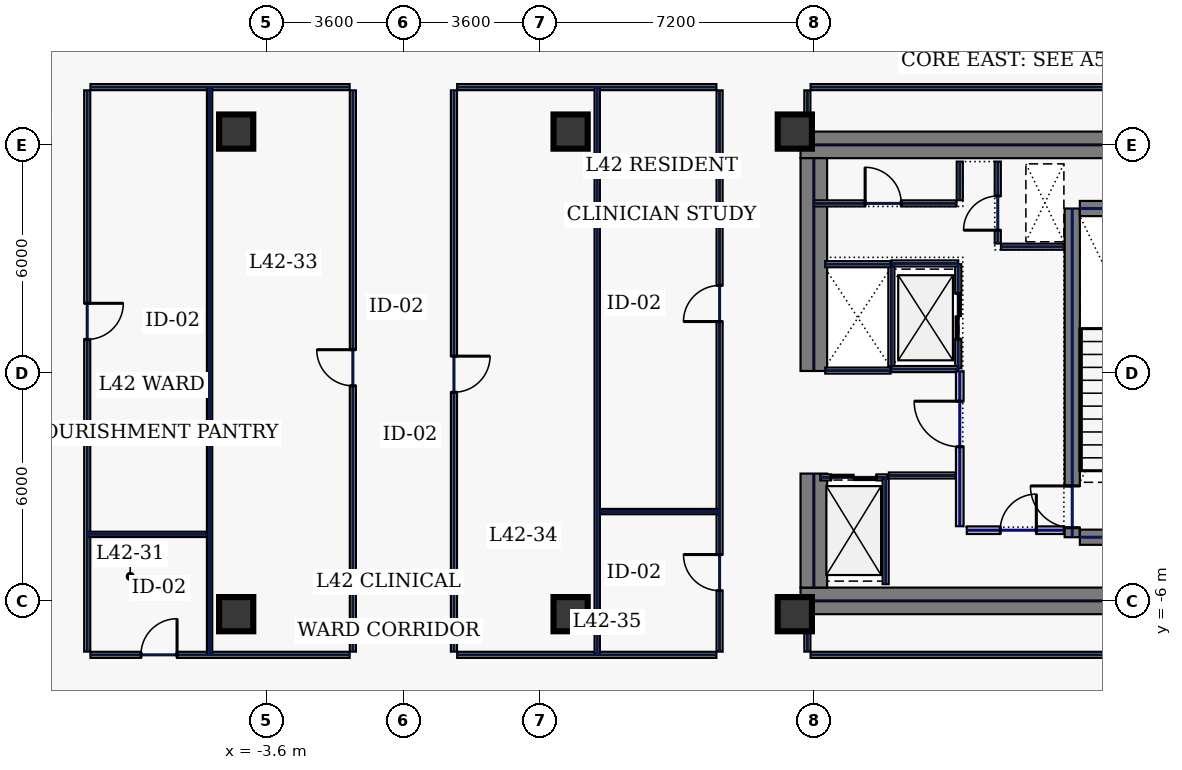
"""IFC4 building model, lengths in metres.
Left out: names, types, materials, properties, quantities, classifications, styles, units other than length and angle.
Written with IfcOpenShell. Run it as: python <this file> out.ifc"""

import sys

from ifc_helpers import new_model, si_unit, direction, frame, frame_2d, origin, origin_2d, place, context, subcontext, project, spatial, rectangle, hollow_rectangle, extrude, element, fill, save


model = new_model("IFC4")
c1 = context("Model", 3, precision=1e-05, world=origin(), true_north=direction((0.0, 1.0)))
c2 = subcontext(c1, "Body", "Model", "MODEL_VIEW")
j1 = project(units=[si_unit("LENGTHUNIT", "METRE"), si_unit("PLANEANGLEUNIT", "RADIAN")], contexts=[c1])
p1 = place(None, origin())
s1 = spatial("IfcSite", under=j1, at=p1, CompositionType="ELEMENT")
p2 = place(p1, origin())
s2 = spatial("IfcBuilding", under=s1, at=p2, CompositionType="ELEMENT")
p3 = place(p2, frame((0.0, 0.0, 184.2)))
s3 = spatial("IfcBuildingStorey", under=s2, at=p3, CompositionType="ELEMENT", Elevation=184.2)
for number, where, z_axis, x_axis in (
    (1, (10.45, 6.0, 0.0), (0.0, 0.0, 1.0), (1.0, 0.0, 0.0)),
    (2, (10.45, -6.0, 0.0), (0.0, 0.0, 1.0), (1.0, 0.0, 0.0)),
):
    element("IfcWall", number, at=place(p3, frame(where, z_axis=z_axis, x_axis=x_axis)), inside=s3, PredefinedType="SHEAR", context=c2, shape_type="SweptSolid", body=[
        extrude(rectangle(XDim=11.55, YDim=0.7, at=frame_2d((5.775, 0.0))), origin(), (0.0, 0.0, 1.0), 3.74),
    ])
p4 = place(p3, frame((10.8, -5.65, 0.0), z_axis=(0.0, 0.0, 1.0), x_axis=(0.0, 1.0, 0.0)))
e3 = element("IfcWall", 3, at=p4, inside=s3, PredefinedType="SHEAR", context=c2, shape_type="SweptSolid", body=[
    extrude(rectangle(XDim=3.0, YDim=0.7, at=frame_2d((1.5, 0.0))), origin(), (0.0, 0.0, 1.0), 3.74),
])
p5 = place(p3, frame((10.8, 0.05, 0.0), z_axis=(0.0, 0.0, 1.0), x_axis=(0.0, 1.0, 0.0)))
e4 = element("IfcWall", 4, at=p5, inside=s3, PredefinedType="SHEAR", context=c2, shape_type="SweptSolid", body=[
    extrude(rectangle(XDim=5.6, YDim=0.7, at=frame_2d((2.8, 0.0))), origin(), (0.0, 0.0, 1.0), 3.74),
])
p6 = place(p3, frame((17.6, -4.325, 0.0), z_axis=(0.0, 0.0, 1.0), x_axis=(0.0, 1.0, 0.0)))
e5 = element("IfcWall", 5, at=p6, inside=s3, PredefinedType="SHEAR", context=c2, shape_type="SweptSolid", body=[
    extrude(rectangle(XDim=8.65, YDim=0.4, at=frame_2d((4.325, 0.0))), origin(), (0.0, 0.0, 1.0), 3.74),
])
p7 = place(p6, frame((0.25, 0.0, 0.0)))
e6 = element("IfcOpeningElement", 6, at=p7, cuts=e5, PredefinedType="OPENING", context=c2, shape_type="SweptSolid", body=[
    extrude(rectangle(XDim=1.1, YDim=2.2, at=frame_2d((0.55, 1.1))), frame((0.0, 0.21, 0.0), z_axis=(0.0, -1.0, 0.0), x_axis=(1.0, 0.0, 0.0)), (0.0, 0.0, 1.0), 0.42),
])
for number, where, z_axis, x_axis in (
    (7, (17.8, -4.325, 0.0), (0.0, 0.0, 1.0), (1.0, 0.0, 0.0)),
    (8, (17.8, 4.325, 0.0), (0.0, 0.0, 1.0), (1.0, 0.0, 0.0)),
):
    element("IfcWall", number, at=place(p3, frame(where, z_axis=z_axis, x_axis=x_axis)), inside=s3, PredefinedType="SHEAR", context=c2, shape_type="SweptSolid", body=[
        extrude(rectangle(XDim=3.4, YDim=0.4, at=frame_2d((1.7, 0.0))), origin(), (0.0, 0.0, 1.0), 3.74),
    ])
for number, where, z_axis, x_axis in (
    (9, (10.3, -6.35, 0.0), (0.0, 0.0, 1.0), (1.0, 0.0, 0.0)),
    (10, (10.3, 6.35, 0.0), (0.0, 0.0, 1.0), (1.0, 0.0, 0.0)),
    (11, (-4.4, -6.35, 0.0), (0.0, 0.0, 1.0), (1.0, 0.0, 0.0)),
    (12, (4.4, -6.35, 0.0), (0.0, 0.0, 1.0), (1.0, 0.0, 0.0)),
    (13, (-4.4, 6.35, 0.0), (0.0, 0.0, 1.0), (1.0, 0.0, 0.0)),
    (14, (4.4, 6.35, 0.0), (0.0, 0.0, 1.0), (1.0, 0.0, 0.0)),
):
    element("IfcColumn", number, at=place(p3, frame(where, z_axis=z_axis, x_axis=x_axis)), inside=s3, PredefinedType="COLUMN", context=c2, shape_type="SweptSolid", body=[
        extrude(hollow_rectangle(XDim=0.9, YDim=0.9, WallThickness=0.04, at=origin_2d()), origin(), (0.0, 0.0, 1.0), 3.74),
    ])
p8 = place(p3, frame((14.6, 0.12, 0.0), z_axis=(0.0, 0.0, 1.0), x_axis=(0.0, 1.0, 0.0)))
e15 = element("IfcWall", 15, at=p8, inside=s3, PredefinedType="PARTITIONING", context=c2, shape_type="SweptSolid", body=[
    extrude(rectangle(XDim=2.74, YDim=0.16, at=frame_2d((1.37, 0.0))), origin(), (0.0, 0.0, 1.0), 3.74),
])
p9 = place(p8, frame((0.77, 0.0, 0.0)))
e16 = element("IfcOpeningElement", 16, at=p9, cuts=e15, PredefinedType="OPENING", context=c2, shape_type="SweptSolid", body=[
    extrude(rectangle(XDim=1.2, YDim=2.2, at=frame_2d((0.6, 1.1))), frame((0.0, 0.09, 0.0), z_axis=(0.0, -1.0, 0.0), x_axis=(1.0, 0.0, 0.0)), (0.0, 0.0, 1.0), 0.18),
])
for number, where, z_axis, x_axis in (
    (17, (12.84, 0.1, 0.0), (0.0, 0.0, 1.0), (1.0, 0.0, 0.0)),
    (18, (12.84, 2.88, 0.0), (0.0, 0.0, 1.0), (1.0, 0.0, 0.0)),
):
    element("IfcWall", number, at=place(p3, frame(where, z_axis=z_axis, x_axis=x_axis)), inside=s3, PredefinedType="PARTITIONING", context=c2, shape_type="SweptSolid", body=[
        extrude(rectangle(XDim=1.76, YDim=0.16, at=frame_2d((0.88, 0.0))), origin(), (0.0, 0.0, 1.0), 3.74),
    ])
p10 = place(p3, frame((12.84, 0.18, 0.0), z_axis=(0.0, 0.0, 1.0), x_axis=(0.0, 1.0, 0.0)))
e19 = element("IfcWall", 19, at=p10, inside=s3, PredefinedType="PARTITIONING", context=c2, shape_type="SweptSolid", body=[
    extrude(rectangle(XDim=2.62, YDim=0.16, at=frame_2d((1.31, 0.0))), origin(), (0.0, 0.0, 1.0), 3.74),
])
p11 = place(p3, frame((10.97, -2.75, 0.0), z_axis=(0.0, 0.0, 1.0), x_axis=(1.0, 0.0, 0.0)))
e20 = element("IfcWall", 20, at=p11, inside=s3, PredefinedType="PARTITIONING", context=c2, shape_type="SweptSolid", body=[
    extrude(rectangle(XDim=1.76, YDim=0.16, at=frame_2d((0.88, 0.0))), origin(), (0.0, 0.0, 1.0), 3.74),
])
p12 = place(p11, frame((0.28, 0.0, 0.0)))
e21 = element("IfcOpeningElement", 21, at=p12, cuts=e20, PredefinedType="OPENING", context=c2, shape_type="SweptSolid", body=[
    extrude(rectangle(XDim=1.2, YDim=2.2, at=frame_2d((0.6, 1.1))), frame((0.0, 0.09, 0.0), z_axis=(0.0, -1.0, 0.0), x_axis=(1.0, 0.0, 0.0)), (0.0, 0.0, 1.0), 0.18),
])
for number, where, z_axis, x_axis in (
    (22, (11.1, 0.06, 0.0), (0.0, 0.0, 1.0), (1.0, 0.0, 0.0)),
    (23, (11.1, 2.86, 0.0), (0.0, 0.0, 1.0), (1.0, 0.0, 0.0)),
):
    element("IfcWall", number, at=place(p3, frame(where, z_axis=z_axis, x_axis=x_axis)), inside=s3, PredefinedType="PARTITIONING", context=c2, shape_type="SweptSolid", body=[
        extrude(rectangle(XDim=1.72, YDim=0.16, at=frame_2d((0.86, 0.0))), origin(), (0.0, 0.0, 1.0), 3.74),
    ])
p13 = place(p3, frame((15.64, 3.405, 0.0), z_axis=(0.0, 0.0, 1.0), x_axis=(0.0, 1.0, 0.0)))
e24 = element("IfcWall", 24, at=p13, inside=s3, PredefinedType="PARTITIONING", context=c2, shape_type="SweptSolid", body=[
    extrude(rectangle(XDim=2.155, YDim=0.16, at=frame_2d((1.078, 0.0))), origin(), (0.0, 0.0, 1.0), 3.74),
])
p14 = place(p13, frame((0.35, 0.0, 0.0)))
e25 = element("IfcOpeningElement", 25, at=p14, cuts=e24, PredefinedType="OPENING", context=c2, shape_type="SweptSolid", body=[
    extrude(rectangle(XDim=0.9, YDim=2.2, at=frame_2d((0.45, 1.1))), frame((0.0, 0.09, 0.0), z_axis=(0.0, -1.0, 0.0), x_axis=(1.0, 0.0, 0.0)), (0.0, 0.0, 1.0), 0.18),
])
p15 = place(p3, frame((15.725, 3.32, 0.0), z_axis=(0.0, 0.0, 1.0), x_axis=(1.0, 0.0, 0.0)))
e26 = element("IfcWall", 26, at=p15, inside=s3, PredefinedType="PARTITIONING", context=c2, shape_type="SweptSolid", body=[
    extrude(rectangle(XDim=1.655, YDim=0.16, at=frame_2d((0.827, 0.0))), origin(), (0.0, 0.0, 1.0), 3.74),
])
p16 = place(p3, frame((14.825, -4.14, 0.0), z_axis=(0.0, 0.0, 1.0), x_axis=(1.0, 0.0, 0.0)))
e27 = element("IfcWall", 27, at=p16, inside=s3, PredefinedType="SOLIDWALL", context=c2, shape_type="SweptSolid", body=[
    extrude(rectangle(XDim=2.555, YDim=0.2, at=frame_2d((1.277, 0.0))), origin(), (0.0, 0.0, 1.0), 3.74),
])
p17 = place(p16, frame((0.88, 0.0, 0.0)))
e28 = element("IfcOpeningElement", 28, at=p17, cuts=e27, PredefinedType="OPENING", context=c2, shape_type="SweptSolid", body=[
    extrude(rectangle(XDim=0.95, YDim=2.2, at=frame_2d((0.475, 1.1))), frame((0.0, 0.11, 0.0), z_axis=(0.0, -1.0, 0.0), x_axis=(1.0, 0.0, 0.0)), (0.0, 0.0, 1.0), 0.22),
])
p18 = place(p3, frame((12.775, -2.7, 0.0), z_axis=(0.0, 0.0, 1.0), x_axis=(1.0, 0.0, 0.0)))
e29 = element("IfcWall", 29, at=p18, inside=s3, PredefinedType="PARTITIONING", context=c2, shape_type="SweptSolid", body=[
    extrude(rectangle(XDim=1.76, YDim=0.16, at=frame_2d((0.88, 0.0))), origin(), (0.0, 0.0, 1.0), 3.74),
])
p19 = place(p3, frame((12.69, -5.56, 0.0), z_axis=(0.0, 0.0, 1.0), x_axis=(0.0, 1.0, 0.0)))
e30 = element("IfcWall", 30, at=p19, inside=s3, PredefinedType="PARTITIONING", context=c2, shape_type="SweptSolid", body=[
    extrude(rectangle(XDim=2.775, YDim=0.16, at=frame_2d((1.388, 0.0))), origin(), (0.0, 0.0, 1.0), 3.74),
])
p20 = place(p3, frame((10.8, 4.46, 0.0), z_axis=(0.0, 0.0, 1.0), x_axis=(1.0, 0.0, 0.0)))
e31 = element("IfcWall", 31, at=p20, inside=s3, PredefinedType="PARTITIONING", context=c2, shape_type="SweptSolid", body=[
    extrude(rectangle(XDim=3.755, YDim=0.16, at=frame_2d((1.877, 0.0))), origin(), (0.0, 0.0, 1.0), 3.74),
])
p21 = place(p20, frame((1.35, 0.0, 0.0)))
e32 = element("IfcOpeningElement", 32, at=p21, cuts=e31, PredefinedType="OPENING", context=c2, shape_type="SweptSolid", body=[
    extrude(rectangle(XDim=0.95, YDim=2.2, at=frame_2d((0.475, 1.1))), frame((0.0, 0.09, 0.0), z_axis=(0.0, -1.0, 0.0), x_axis=(1.0, 0.0, 0.0)), (0.0, 0.0, 1.0), 0.18),
])
p22 = place(p3, frame((14.64, 4.545, 0.0), z_axis=(0.0, 0.0, 1.0), x_axis=(0.0, 1.0, 0.0)))
e33 = element("IfcWall", 33, at=p22, inside=s3, PredefinedType="PARTITIONING", context=c2, shape_type="SweptSolid", body=[
    extrude(rectangle(XDim=1.015, YDim=0.16, at=frame_2d((0.508, 0.0))), origin(), (0.0, 0.0, 1.0), 3.74),
])
p23 = place(p3, frame((14.64, -4.035, 0.0), z_axis=(0.0, 0.0, 1.0), x_axis=(0.0, 1.0, 0.0)))
e34 = element("IfcWall", 34, at=p23, inside=s3, PredefinedType="SOLIDWALL", context=c2, shape_type="SweptSolid", body=[
    extrude(rectangle(XDim=4.075, YDim=0.2, at=frame_2d((2.038, 0.0))), origin(), (0.0, 0.0, 1.0), 3.74),
])
p24 = place(p23, frame((2.09, 0.0, 0.0)))
e35 = element("IfcOpeningElement", 35, at=p24, cuts=e34, PredefinedType="OPENING", context=c2, shape_type="SweptSolid", body=[
    extrude(rectangle(XDim=1.2, YDim=2.2, at=frame_2d((0.6, 1.1))), frame((0.0, 0.11, 0.0), z_axis=(0.0, -1.0, 0.0), x_axis=(1.0, 0.0, 0.0)), (0.0, 0.0, 1.0), 0.22),
])
p25 = place(p3, frame((24.965, 7.52, 0.0), z_axis=(0.0, 0.0, 1.0), x_axis=(-1.0, 0.0, 0.0)))
e36 = element("IfcWall", 36, at=p25, inside=s3, PredefinedType="PARTITIONING", context=c2, shape_type="SweptSolid", body=[
    extrude(rectangle(XDim=14.25, YDim=0.16, at=frame_2d((7.125, 0.0))), origin(), (0.0, 0.0, 1.0), 3.74),
])
p26 = place(p3, frame((10.63, 7.435, 0.0), z_axis=(0.0, 0.0, 1.0), x_axis=(0.0, -1.0, 0.0)))
e37 = element("IfcWall", 37, at=p26, inside=s3, PredefinedType="PARTITIONING", context=c2, shape_type="SweptSolid", body=[
    extrude(rectangle(XDim=1.015, YDim=0.16, at=frame_2d((0.508, 0.0))), origin(), (0.0, 0.0, 1.0), 3.285),
])
p27 = place(p3, frame((10.63, -6.42, 0.0), z_axis=(0.0, 0.0, 1.0), x_axis=(0.0, -1.0, 0.0)))
e38 = element("IfcWall", 38, at=p27, inside=s3, PredefinedType="PARTITIONING", context=c2, shape_type="SweptSolid", body=[
    extrude(rectangle(XDim=0.915, YDim=0.16, at=frame_2d((0.458, 0.0))), origin(), (0.0, 0.0, 1.0), 3.74),
])
p28 = place(p3, frame((10.715, -7.42, 0.0), z_axis=(0.0, 0.0, 1.0), x_axis=(1.0, 0.0, 0.0)))
e39 = element("IfcWall", 39, at=p28, inside=s3, PredefinedType="PARTITIONING", context=c2, shape_type="SweptSolid", body=[
    extrude(rectangle(XDim=14.25, YDim=0.16, at=frame_2d((7.125, 0.0))), origin(), (0.0, 0.0, 1.0), 3.74),
])
p29 = place(p3, frame((8.235, 7.52, 0.0), z_axis=(0.0, 0.0, 1.0), x_axis=(-1.0, 0.0, 0.0)))
e40 = element("IfcWall", 40, at=p29, inside=s3, PredefinedType="PARTITIONING", context=c2, shape_type="SweptSolid", body=[
    extrude(rectangle(XDim=6.82, YDim=0.16, at=frame_2d((3.41, 0.0))), origin(), (0.0, 0.0, 1.0), 3.74),
])
p30 = place(p3, frame((1.33, 7.435, 0.0), z_axis=(0.0, 0.0, 1.0), x_axis=(0.0, -1.0, 0.0)))
e41 = element("IfcWall", 41, at=p30, inside=s3, PredefinedType="PARTITIONING", context=c2, shape_type="SweptSolid", body=[
    extrude(rectangle(XDim=14.77, YDim=0.16, at=frame_2d((7.385, 0.0))), origin(), (0.0, 0.0, 1.0), 3.74),
])
p31 = place(p30, frame((6.995, 0.0, 0.0)))
e42 = element("IfcOpeningElement", 42, at=p31, cuts=e41, PredefinedType="OPENING", context=c2, shape_type="SweptSolid", body=[
    extrude(rectangle(XDim=0.95, YDim=2.2, at=frame_2d((0.475, 1.1))), frame((0.0, 0.09, 0.0), z_axis=(0.0, -1.0, 0.0), x_axis=(1.0, 0.0, 0.0)), (0.0, 0.0, 1.0), 0.18),
])
p32 = place(p3, frame((1.415, -7.42, 0.0), z_axis=(0.0, 0.0, 1.0), x_axis=(1.0, 0.0, 0.0)))
e43 = element("IfcWall", 43, at=p32, inside=s3, PredefinedType="PARTITIONING", context=c2, shape_type="SweptSolid", body=[
    extrude(rectangle(XDim=6.82, YDim=0.16, at=frame_2d((3.41, 0.0))), origin(), (0.0, 0.0, 1.0), 3.74),
])
p33 = place(p3, frame((8.32, -7.335, 0.0), z_axis=(0.0, 0.0, 1.0), x_axis=(0.0, 1.0, 0.0)))
e44 = element("IfcWall", 44, at=p33, inside=s3, PredefinedType="PARTITIONING", context=c2, shape_type="SweptSolid", body=[
    extrude(rectangle(XDim=14.77, YDim=0.16, at=frame_2d((7.385, 0.0))), origin(), (0.0, 0.0, 1.0), 3.74),
])
p34 = place(p33, frame((1.604, 0.0, 0.0)))
e45 = element("IfcOpeningElement", 45, at=p34, cuts=e44, PredefinedType="OPENING", context=c2, shape_type="SweptSolid", body=[
    extrude(rectangle(XDim=0.95, YDim=2.2, at=frame_2d((0.475, 1.1))), frame((0.0, 0.09, 0.0), z_axis=(0.0, -1.0, 0.0), x_axis=(1.0, 0.0, 0.0)), (0.0, 0.0, 1.0), 0.18),
])
p35 = place(p33, frame((8.686, 0.0, 0.0)))
e46 = element("IfcOpeningElement", 46, at=p35, cuts=e44, PredefinedType="OPENING", context=c2, shape_type="SweptSolid", body=[
    extrude(rectangle(XDim=0.95, YDim=2.2, at=frame_2d((0.475, 1.1))), frame((0.0, 0.09, 0.0), z_axis=(0.0, -1.0, 0.0), x_axis=(1.0, 0.0, 0.0)), (0.0, 0.0, 1.0), 0.18),
])
p36 = place(p3, frame((-1.33, -7.335, 0.0), z_axis=(0.0, 0.0, 1.0), x_axis=(0.0, 1.0, 0.0)))
e47 = element("IfcWall", 47, at=p36, inside=s3, PredefinedType="PARTITIONING", context=c2, shape_type="SweptSolid", body=[
    extrude(rectangle(XDim=14.77, YDim=0.16, at=frame_2d((7.385, 0.0))), origin(), (0.0, 0.0, 1.0), 3.74),
])
p37 = place(p36, frame((6.995, 0.0, 0.0)))
e48 = element("IfcOpeningElement", 48, at=p37, cuts=e47, PredefinedType="OPENING", context=c2, shape_type="SweptSolid", body=[
    extrude(rectangle(XDim=0.95, YDim=2.2, at=frame_2d((0.475, 1.1))), frame((0.0, 0.09, 0.0), z_axis=(0.0, -1.0, 0.0), x_axis=(1.0, 0.0, 0.0)), (0.0, 0.0, 1.0), 0.18),
])
p38 = place(p3, frame((-1.415, 7.52, 0.0), z_axis=(0.0, 0.0, 1.0), x_axis=(-1.0, 0.0, 0.0)))
e49 = element("IfcWall", 49, at=p38, inside=s3, PredefinedType="PARTITIONING", context=c2, shape_type="SweptSolid", body=[
    extrude(rectangle(XDim=6.82, YDim=0.16, at=frame_2d((3.41, 0.0))), origin(), (0.0, 0.0, 1.0), 3.74),
])
p39 = place(p3, frame((-8.32, 7.435, 0.0), z_axis=(0.0, 0.0, 1.0), x_axis=(0.0, -1.0, 0.0)))
e50 = element("IfcWall", 50, at=p39, inside=s3, PredefinedType="PARTITIONING", context=c2, shape_type="SweptSolid", body=[
    extrude(rectangle(XDim=14.77, YDim=0.16, at=frame_2d((7.385, 0.0))), origin(), (0.0, 0.0, 1.0), 3.74),
])
p40 = place(p39, frame((5.604, 0.0, 0.0)))
e51 = element("IfcOpeningElement", 51, at=p40, cuts=e50, PredefinedType="OPENING", context=c2, shape_type="SweptSolid", body=[
    extrude(rectangle(XDim=0.95, YDim=2.2, at=frame_2d((0.475, 1.1))), frame((0.0, 0.09, 0.0), z_axis=(0.0, -1.0, 0.0), x_axis=(1.0, 0.0, 0.0)), (0.0, 0.0, 1.0), 0.18),
])
p41 = place(p3, frame((-8.235, -7.42, 0.0), z_axis=(0.0, 0.0, 1.0), x_axis=(1.0, 0.0, 0.0)))
e52 = element("IfcWall", 52, at=p41, inside=s3, PredefinedType="PARTITIONING", context=c2, shape_type="SweptSolid", body=[
    extrude(rectangle(XDim=6.82, YDim=0.16, at=frame_2d((3.41, 0.0))), origin(), (0.0, 0.0, 1.0), 3.74),
])
p42 = place(p41, frame((1.329, 0.0, 0.0)))
e53 = element("IfcOpeningElement", 53, at=p42, cuts=e52, PredefinedType="OPENING", context=c2, shape_type="SweptSolid", body=[
    extrude(rectangle(XDim=0.95, YDim=2.2, at=frame_2d((0.475, 1.1))), frame((0.0, 0.09, 0.0), z_axis=(0.0, -1.0, 0.0), x_axis=(1.0, 0.0, 0.0)), (0.0, 0.0, 1.0), 0.18),
])
for number, where, z_axis, x_axis in (
    (54, (-5.1, -7.415, 0.0), (0.0, 0.0, 1.0), (0.0, 1.0, 0.0)),
    (55, (5.1, -7.415, 0.0), (0.0, 0.0, 1.0), (0.0, 1.0, 0.0)),
):
    element("IfcWall", number, at=place(p3, frame(where, z_axis=z_axis, x_axis=x_axis)), inside=s3, PredefinedType="PARTITIONING", context=c2, shape_type="SweptSolid", body=[
        extrude(rectangle(XDim=14.93, YDim=0.14, at=frame_2d((7.465, 0.0))), origin(), (0.0, 0.0, 1.0), 3.74),
    ])
for number, where, z_axis, x_axis in (
    (56, (-8.315, -4.25, 0.0), (0.0, 0.0, 1.0), (1.0, 0.0, 0.0)),
    (57, (5.175, -3.65, 0.0), (0.0, 0.0, 1.0), (1.0, 0.0, 0.0)),
):
    element("IfcWall", number, at=place(p3, frame(where, z_axis=z_axis, x_axis=x_axis)), inside=s3, PredefinedType="PARTITIONING", context=c2, shape_type="SweptSolid", body=[
        extrude(rectangle(XDim=3.14, YDim=0.14, at=frame_2d((1.57, 0.0))), origin(), (0.0, 0.0, 1.0), 3.74),
    ])
p43 = place(p7, origin())
e58 = element("IfcDoor", 58, at=p43, inside=s3, OperationType="SINGLE_SWING_RIGHT", PredefinedType="DOOR", context=c2, shape_type="SweptSolid", body=[
    extrude(rectangle(XDim=1.1, YDim=2.2, at=frame_2d((0.55, 1.1))), frame((0.0, 0.025, 0.0), z_axis=(0.0, -1.0, 0.0), x_axis=(1.0, 0.0, 0.0)), (0.0, 0.0, 1.0), 0.05),
])
fill(e6, e58)
p44 = place(p9, origin())
e59 = element("IfcDoor", 59, at=p44, inside=s3, OperationType="SLIDING_TO_LEFT", PredefinedType="DOOR", context=c2, shape_type="SweptSolid", body=[
    extrude(rectangle(XDim=1.2, YDim=2.2, at=frame_2d((0.6, 1.1))), frame((0.0, 0.025, 0.0), z_axis=(0.0, -1.0, 0.0), x_axis=(1.0, 0.0, 0.0)), (0.0, 0.0, 1.0), 0.05),
])
fill(e16, e59)
p45 = place(p12, origin())
e60 = element("IfcDoor", 60, at=p45, inside=s3, OperationType="SLIDING_TO_LEFT", PredefinedType="DOOR", context=c2, shape_type="SweptSolid", body=[
    extrude(rectangle(XDim=1.2, YDim=2.2, at=frame_2d((0.6, 1.1))), frame((0.0, 0.025, 0.0), z_axis=(0.0, -1.0, 0.0), x_axis=(1.0, 0.0, 0.0)), (0.0, 0.0, 1.0), 0.05),
])
fill(e21, e60)
p46 = place(p14, origin())
e61 = element("IfcDoor", 61, at=p46, inside=s3, OperationType="SINGLE_SWING_LEFT", PredefinedType="DOOR", context=c2, shape_type="SweptSolid", body=[
    extrude(rectangle(XDim=0.9, YDim=2.2, at=frame_2d((0.45, 1.1))), frame((0.0, 0.025, 0.0), z_axis=(0.0, -1.0, 0.0), x_axis=(1.0, 0.0, 0.0)), (0.0, 0.0, 1.0), 0.05),
])
fill(e25, e61)
p47 = place(p17, origin())
e62 = element("IfcDoor", 62, at=p47, inside=s3, OperationType="SINGLE_SWING_RIGHT", PredefinedType="DOOR", context=c2, shape_type="SweptSolid", body=[
    extrude(rectangle(XDim=0.95, YDim=2.2, at=frame_2d((0.475, 1.1))), frame((0.0, 0.025, 0.0), z_axis=(0.0, -1.0, 0.0), x_axis=(1.0, 0.0, 0.0)), (0.0, 0.0, 1.0), 0.05),
])
fill(e28, e62)
p48 = place(p21, origin())
e63 = element("IfcDoor", 63, at=p48, inside=s3, OperationType="SINGLE_SWING_LEFT", PredefinedType="DOOR", context=c2, shape_type="SweptSolid", body=[
    extrude(rectangle(XDim=0.95, YDim=2.2, at=frame_2d((0.475, 1.1))), frame((0.0, 0.025, 0.0), z_axis=(0.0, -1.0, 0.0), x_axis=(1.0, 0.0, 0.0)), (0.0, 0.0, 1.0), 0.05),
])
fill(e32, e63)
p49 = place(p24, origin())
e64 = element("IfcDoor", 64, at=p49, inside=s3, OperationType="SINGLE_SWING_RIGHT", PredefinedType="DOOR", context=c2, shape_type="SweptSolid", body=[
    extrude(rectangle(XDim=1.2, YDim=2.2, at=frame_2d((0.6, 1.1))), frame((0.0, 0.025, 0.0), z_axis=(0.0, -1.0, 0.0), x_axis=(1.0, 0.0, 0.0)), (0.0, 0.0, 1.0), 0.05),
])
fill(e35, e64)
p50 = place(p42, origin())
e65 = element("IfcDoor", 65, at=p50, inside=s3, OperationType="SINGLE_SWING_RIGHT", PredefinedType="DOOR", context=c2, shape_type="SweptSolid", body=[
    extrude(rectangle(XDim=0.95, YDim=2.2, at=frame_2d((0.475, 1.1))), frame((0.0, 0.025, 0.0), z_axis=(0.0, -1.0, 0.0), x_axis=(1.0, 0.0, 0.0)), (0.0, 0.0, 1.0), 0.05),
])
fill(e53, e65)
p51 = place(p40, origin())
e66 = element("IfcDoor", 66, at=p51, inside=s3, OperationType="SINGLE_SWING_LEFT", PredefinedType="DOOR", context=c2, shape_type="SweptSolid", body=[
    extrude(rectangle(XDim=0.95, YDim=2.2, at=frame_2d((0.475, 1.1))), frame((0.0, 0.025, 0.0), z_axis=(0.0, -1.0, 0.0), x_axis=(1.0, 0.0, 0.0)), (0.0, 0.0, 1.0), 0.05),
])
fill(e51, e66)
p52 = place(p37, origin())
e67 = element("IfcDoor", 67, at=p52, inside=s3, OperationType="SINGLE_SWING_RIGHT", PredefinedType="DOOR", context=c2, shape_type="SweptSolid", body=[
    extrude(rectangle(XDim=0.95, YDim=2.2, at=frame_2d((0.475, 1.1))), frame((0.0, 0.025, 0.0), z_axis=(0.0, -1.0, 0.0), x_axis=(1.0, 0.0, 0.0)), (0.0, 0.0, 1.0), 0.05),
])
fill(e48, e67)
p53 = place(p31, origin())
e68 = element("IfcDoor", 68, at=p53, inside=s3, OperationType="SINGLE_SWING_LEFT", PredefinedType="DOOR", context=c2, shape_type="SweptSolid", body=[
    extrude(rectangle(XDim=0.95, YDim=2.2, at=frame_2d((0.475, 1.1))), frame((0.0, 0.025, 0.0), z_axis=(0.0, -1.0, 0.0), x_axis=(1.0, 0.0, 0.0)), (0.0, 0.0, 1.0), 0.05),
])
fill(e42, e68)
p54 = place(p34, origin())
e69 = element("IfcDoor", 69, at=p54, inside=s3, OperationType="SINGLE_SWING_RIGHT", PredefinedType="DOOR", context=c2, shape_type="SweptSolid", body=[
    extrude(rectangle(XDim=0.95, YDim=2.2, at=frame_2d((0.475, 1.1))), frame((0.0, 0.025, 0.0), z_axis=(0.0, -1.0, 0.0), x_axis=(1.0, 0.0, 0.0)), (0.0, 0.0, 1.0), 0.05),
])
fill(e45, e69)
p55 = place(p35, origin())
e70 = element("IfcDoor", 70, at=p55, inside=s3, OperationType="SINGLE_SWING_LEFT", PredefinedType="DOOR", context=c2, shape_type="SweptSolid", body=[
    extrude(rectangle(XDim=0.95, YDim=2.2, at=frame_2d((0.475, 1.1))), frame((0.0, 0.025, 0.0), z_axis=(0.0, -1.0, 0.0), x_axis=(1.0, 0.0, 0.0)), (0.0, 0.0, 1.0), 0.05),
])
fill(e46, e70)
save(model, sys.argv[1])
